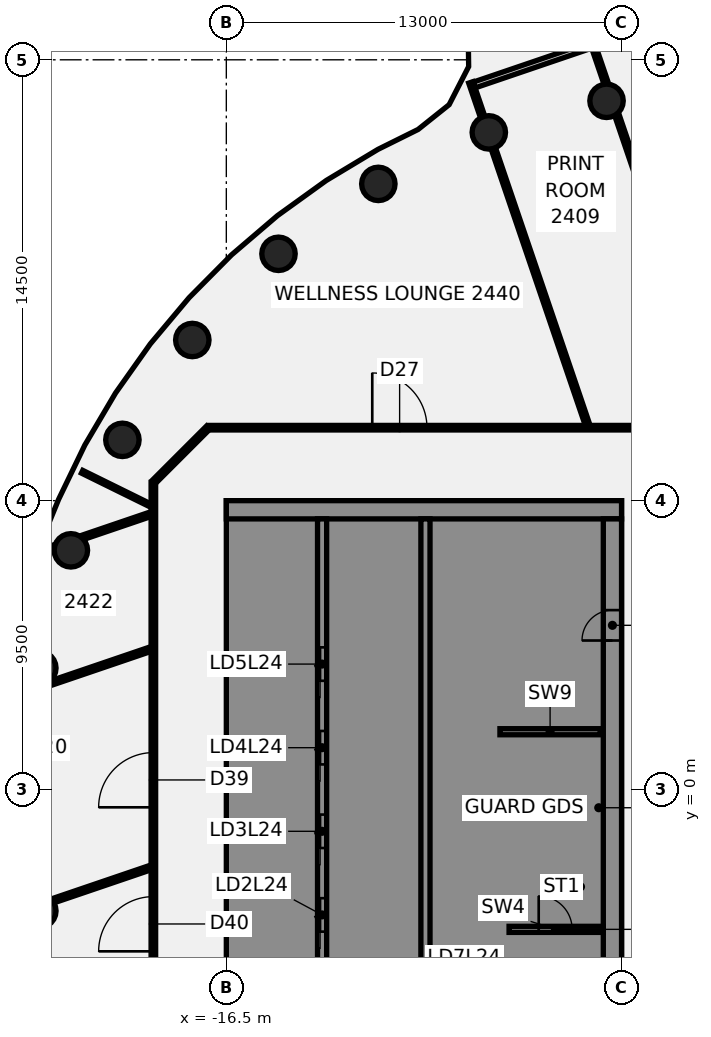
"""IFC4 building model, lengths in metres.
Left out: names, types, materials, properties, quantities, classifications, styles, units other than length and angle.
Written with IfcOpenShell. Run it as: python <this file> out.ifc"""

import sys

from ifc_helpers import new_model, si_unit, direction, frame, frame_2d, origin, origin_2d, place, context, subcontext, project, spatial, polyline, rectangle, circle, outline, extrude, element, fill, save


model = new_model("IFC4")
c1 = context("Model", 3, precision=1e-05, world=origin(), true_north=direction((0.0, 1.0)))
c2 = subcontext(c1, "Body", "Model", "MODEL_VIEW")
j1 = project(units=[si_unit("LENGTHUNIT", "METRE"), si_unit("PLANEANGLEUNIT", "RADIAN")], contexts=[c1])
p1 = place(None, origin())
s1 = spatial("IfcSite", under=j1, at=p1, CompositionType="ELEMENT")
p2 = place(p1, origin())
s2 = spatial("IfcBuilding", under=s1, at=p2, CompositionType="ELEMENT")
p3 = place(p2, frame((0.0, 0.0, 102.25)))
s3 = spatial("IfcBuildingStorey", under=s2, at=p3, CompositionType="ELEMENT", Elevation=102.25)
for number, where, z_axis, x_axis in (
    (1, (-3.994, 22.651, -0.14), (0.0, 0.0, 1.0), (1.0, 0.0, 0.0)),
    (2, (-7.866, 21.613, -0.14), (0.0, 0.0, 1.0), (1.0, 0.0, 0.0)),
    (3, (-11.5, 19.919, -0.14), (0.0, 0.0, 1.0), (1.0, 0.0, 0.0)),
    (4, (-14.784, 17.619, -0.14), (0.0, 0.0, 1.0), (1.0, 0.0, 0.0)),
    (5, (-17.619, 14.784, -0.14), (0.0, 0.0, 1.0), (1.0, 0.0, 0.0)),
    (6, (-19.919, 11.5, -0.14), (0.0, 0.0, 1.0), (1.0, 0.0, 0.0)),
    (7, (-21.613, 7.866, -0.14), (0.0, 0.0, 1.0), (1.0, 0.0, 0.0)),
    (8, (-22.651, 3.994, -0.14), (0.0, 0.0, 1.0), (1.0, 0.0, 0.0)),
    (9, (-22.651, -3.994, -0.14), (0.0, 0.0, 1.0), (1.0, 0.0, 0.0)),
):
    element("IfcColumn", number, at=place(p3, frame(where, z_axis=z_axis, x_axis=x_axis)), inside=s3, PredefinedType="COLUMN", context=c2, shape_type="SweptSolid", body=[
        extrude(circle(Radius=0.55, at=origin_2d()), origin(), (0.0, 0.0, 1.0), 3.75),
    ])
p4 = place(p3, frame((-8.457, 23.257, 0.0), z_axis=(0.0, 0.0, 1.0), x_axis=(0.322310236729, -0.946634095783, 0.0)))
e10 = element("IfcWall", 10, at=p4, inside=s3, PredefinedType="PARTITIONING", context=c2, shape_type="SweptSolid", body=[
    extrude(rectangle(XDim=1.203, YDim=0.15, at=frame_2d((0.602, 0.0))), origin(), (0.0, 0.0, 1.0), 3.01),
])
p5 = place(p3, frame((-7.719, 21.092, 0.0), z_axis=(0.0, 0.0, 1.0), x_axis=(0.322369221252, -0.946614010666, 0.0)))
e11 = element("IfcWall", 11, at=p5, inside=s3, PredefinedType="PARTITIONING", context=c2, shape_type="SweptSolid", body=[
    extrude(rectangle(XDim=9.626, YDim=0.15, at=frame_2d((4.813, 0.0))), origin(), (0.0, 0.0, 1.0), 3.01),
])
p6 = place(p3, frame((-4.411, 24.406, 0.0), z_axis=(0.0, 0.0, 1.0), x_axis=(0.322528601909, -0.94655971864, 0.0)))
e12 = element("IfcWall", 12, at=p6, inside=s3, PredefinedType="PARTITIONING", context=c2, shape_type="SweptSolid", body=[
    extrude(rectangle(XDim=1.266, YDim=0.15, at=frame_2d((0.633, 0.0))), origin(), (0.0, 0.0, 1.0), 3.01),
])
p7 = place(p3, frame((-3.665, 22.215, 0.0), z_axis=(0.0, 0.0, 1.0), x_axis=(0.322345171012, -0.94662220063, 0.0)))
e13 = element("IfcWall", 13, at=p7, inside=s3, PredefinedType="PARTITIONING", context=c2, shape_type="SweptSolid", body=[
    extrude(rectangle(XDim=10.812, YDim=0.15, at=frame_2d((5.406, 0.0))), origin(), (0.0, 0.0, 1.0), 3.01),
])
p8 = place(p7, frame((6.45, 0.0, 0.0)))
e14 = element("IfcOpeningElement", 14, at=p8, cuts=e13, PredefinedType="OPENING", context=c2, shape_type="SweptSolid", body=[
    extrude(rectangle(XDim=0.9, YDim=2.1, at=frame_2d((0.45, 1.05))), frame((0.0, 0.085, 0.0), z_axis=(0.0, -1.0, 0.0), x_axis=(1.0, 0.0, 0.0)), (0.0, 0.0, 1.0), 0.17),
])
p9 = place(p3, frame((-21.244, 10.45, 0.0), z_axis=(0.0, 0.0, 1.0), x_axis=(0.897216700268, -0.441590526122, 0.0)))
e15 = element("IfcWall", 15, at=p9, inside=s3, PredefinedType="PARTITIONING", context=c2, shape_type="SweptSolid", body=[
    extrude(rectangle(XDim=2.522, YDim=0.1, at=frame_2d((1.261, 0.0))), origin(), (0.0, 0.0, 1.0), 3.01),
])
p10 = place(p3, frame((-17.065, 11.9, 0.0), z_axis=(0.0, 0.0, 1.0), x_axis=(1.0, 0.0, 0.0)))
e16 = element("IfcWall", 16, at=p10, inside=s3, PredefinedType="PARTITIONING", context=c2, shape_type="SweptSolid", body=[
    extrude(rectangle(XDim=34.165, YDim=0.15, at=frame_2d((17.083, 0.0))), origin(), (0.0, 0.0, 1.0), 3.01),
])
p11 = place(p10, frame((19.613, 0.0, 0.0)))
e17 = element("IfcOpeningElement", 17, at=p11, cuts=e16, PredefinedType="OPENING", context=c2, shape_type="SweptSolid", body=[
    extrude(rectangle(XDim=1.8, YDim=2.1, at=frame_2d((0.9, 1.05))), frame((0.0, 0.085, 0.0), z_axis=(0.0, -1.0, 0.0), x_axis=(1.0, 0.0, 0.0)), (0.0, 0.0, 1.0), 0.17),
])
p12 = place(p10, frame((30.933, 0.0, 0.0)))
e18 = element("IfcOpeningElement", 18, at=p12, cuts=e16, PredefinedType="OPENING", context=c2, shape_type="SweptSolid", body=[
    extrude(rectangle(XDim=1.8, YDim=2.1, at=frame_2d((0.9, 1.05))), frame((0.0, 0.085, 0.0), z_axis=(0.0, -1.0, 0.0), x_axis=(1.0, 0.0, 0.0)), (0.0, 0.0, 1.0), 0.17),
])
p13 = place(p10, frame((5.365, 0.0, 0.0)))
e19 = element("IfcOpeningElement", 19, at=p13, cuts=e16, PredefinedType="OPENING", context=c2, shape_type="SweptSolid", body=[
    extrude(rectangle(XDim=1.8, YDim=2.1, at=frame_2d((0.9, 1.05))), frame((0.0, 0.085, 0.0), z_axis=(0.0, -1.0, 0.0), x_axis=(1.0, 0.0, 0.0)), (0.0, 0.0, 1.0), 0.17),
])
p14 = place(p3, frame((-26.598, 2.025, 0.0), z_axis=(0.0, 0.0, 1.0), x_axis=(0.946606379471, 0.322391628838, 0.0)))
e20 = element("IfcWall", 20, at=p14, inside=s3, PredefinedType="PARTITIONING", context=c2, shape_type="SweptSolid", body=[
    extrude(rectangle(XDim=8.048, YDim=0.15, at=frame_2d((4.024, 0.0))), origin(), (0.0, 0.0, 1.0), 3.01),
])
p15 = place(p14, frame((2.45, 0.0, 0.0)))
e21 = element("IfcOpeningElement", 21, at=p15, cuts=e20, PredefinedType="OPENING", context=c2, shape_type="SweptSolid", body=[
    extrude(rectangle(XDim=0.9, YDim=2.1, at=frame_2d((0.45, 1.05))), frame((0.0, 0.085, 0.0), z_axis=(0.0, -1.0, 0.0), x_axis=(1.0, 0.0, 0.0)), (0.0, 0.0, 1.0), 0.17),
])
p16 = place(p3, frame((-22.215, -3.665, 0.0), z_axis=(0.0, 0.0, 1.0), x_axis=(0.946648978423, 0.322266522697, 0.0)))
e22 = element("IfcWall", 22, at=p16, inside=s3, PredefinedType="PARTITIONING", context=c2, shape_type="SweptSolid", body=[
    extrude(rectangle(XDim=3.417, YDim=0.15, at=frame_2d((1.708, 0.0))), origin(), (0.0, 0.0, 1.0), 3.01),
])
p17 = place(p3, frame((-22.467, 7.869, 0.0), z_axis=(0.0, 0.0, 1.0), x_axis=(0.946742345381, 0.321992129505, 0.0)))
e23 = element("IfcWall", 23, at=p17, inside=s3, PredefinedType="PARTITIONING", context=c2, shape_type="SweptSolid", body=[
    extrude(rectangle(XDim=0.343, YDim=0.15, at=frame_2d((0.171, 0.0))), origin(), (0.0, 0.0, 1.0), 3.01),
])
p18 = place(p3, frame((-21.261, 8.28, 0.0), z_axis=(0.0, 0.0, 1.0), x_axis=(0.946606493427, 0.32239129424, 0.0)))
e24 = element("IfcWall", 24, at=p18, inside=s3, PredefinedType="PARTITIONING", context=c2, shape_type="SweptSolid", body=[
    extrude(rectangle(XDim=2.41, YDim=0.15, at=frame_2d((1.205, 0.0))), origin(), (0.0, 0.0, 1.0), 3.01),
])
p19 = place(p3, frame((-8.348, 23.171, 0.0), z_axis=(0.0, 0.0, 1.0), x_axis=(0.946615697292, 0.322364268555, 0.0)))
e25 = element("IfcWall", 25, at=p19, inside=s3, PredefinedType="PARTITIONING", context=c2, shape_type="SweptSolid", body=[
    extrude(rectangle(XDim=14.224, YDim=0.2, at=frame_2d((7.112, 0.0))), origin(), (0.0, 0.0, 1.0), 3.01),
])
p20 = place(p19, frame((6.925, 0.0, 0.0)))
e26 = element("IfcOpeningElement", 26, at=p20, cuts=e25, PredefinedType="OPENING", context=c2, shape_type="SweptSolid", body=[
    extrude(rectangle(XDim=1.4, YDim=2.1, at=frame_2d((0.7, 1.05))), frame((0.0, 0.11, 0.0), z_axis=(0.0, -1.0, 0.0), x_axis=(1.0, 0.0, 0.0)), (0.0, 0.0, 1.0), 0.22),
])
p21 = place(p19, frame((9.175, 0.0, 0.0)))
e27 = element("IfcOpeningElement", 27, at=p21, cuts=e25, PredefinedType="OPENING", context=c2, shape_type="SweptSolid", body=[
    extrude(rectangle(XDim=0.9, YDim=2.1, at=frame_2d((0.45, 1.05))), frame((0.0, 0.11, 0.0), z_axis=(0.0, -1.0, 0.0), x_axis=(1.0, 0.0, 0.0)), (0.0, 0.0, 1.0), 0.22),
])
p22 = place(p3, frame((-18.872, 10.128, 0.0), z_axis=(0.0, 0.0, 1.0), x_axis=(0.707106781187, 0.707106781187, 0.0)))
e28 = element("IfcWall", 28, at=p22, inside=s3, PredefinedType="PARTITIONING", context=c2, shape_type="SweptSolid", body=[
    extrude(rectangle(XDim=2.505, YDim=0.15, at=frame_2d((1.253, 0.0))), origin(), (0.0, 0.0, 1.0), 3.01),
])
p23 = place(p3, frame((-18.9, -10.1, 0.0), z_axis=(0.0, 0.0, 1.0), x_axis=(0.0, 1.0, 0.0)))
e29 = element("IfcWall", 29, at=p23, inside=s3, PredefinedType="PARTITIONING", context=c2, shape_type="SweptSolid", body=[
    extrude(rectangle(XDim=20.2, YDim=0.15, at=frame_2d((10.1, 0.0))), origin(), (0.0, 0.0, 1.0), 3.01),
])
p24 = place(p23, frame((9.514, 0.0, 0.0)))
e30 = element("IfcOpeningElement", 30, at=p24, cuts=e29, PredefinedType="OPENING", context=c2, shape_type="SweptSolid", body=[
    extrude(rectangle(XDim=1.8, YDim=2.1, at=frame_2d((0.9, 1.05))), frame((0.0, 0.085, 0.0), z_axis=(0.0, -1.0, 0.0), x_axis=(1.0, 0.0, 0.0)), (0.0, 0.0, 1.0), 0.17),
])
p25 = place(p23, frame((4.777, 0.0, 0.0)))
e31 = element("IfcOpeningElement", 31, at=p25, cuts=e29, PredefinedType="OPENING", context=c2, shape_type="SweptSolid", body=[
    extrude(rectangle(XDim=1.8, YDim=2.1, at=frame_2d((0.9, 1.05))), frame((0.0, 0.085, 0.0), z_axis=(0.0, -1.0, 0.0), x_axis=(1.0, 0.0, 0.0)), (0.0, 0.0, 1.0), 0.17),
])
p26 = place(p3, origin())
e32 = element("IfcWall", 32, at=p26, inside=s3, PredefinedType="SHEAR", context=c2, shape_type="SweptSolid", body=[
    extrude(outline(polyline([(-13.5, -8.9), (-13.5, -8.125), (-15.9, -8.125), (-15.9, -5.625), (-13.5, -5.625), (-13.5, -5.375), (-15.9, -5.375), (-15.9, -2.875), (-13.5, -2.875), (-13.5, -2.625), (-15.9, -2.625), (-15.9, -0.125), (-13.5, -0.125), (-13.5, 0.125), (-15.9, 0.125), (-15.9, 2.625), (-13.5, 2.625), (-13.5, 2.875), (-15.9, 2.875), (-15.9, 5.375), (-13.5, 5.375), (-13.5, 5.625), (-15.9, 5.625), (-15.9, 8.125), (-13.5, 8.125), (-13.5, 8.9), (-15.9, 8.9), (-16.5, 8.9), (-16.5, -8.9), (-15.9, -8.9), (-13.5, -8.9)])), origin(), (0.0, 0.0, 1.0), 3.61),
])
p27 = place(p3, frame((-16.5, 9.2, 0.0), z_axis=(0.0, 0.0, 1.0), x_axis=(1.0, 0.0, 0.0)))
e33 = element("IfcWall", 33, at=p27, inside=s3, PredefinedType="SHEAR", context=c2, shape_type="SweptSolid", body=[
    extrude(rectangle(XDim=13.0, YDim=0.6, at=frame_2d((6.5, 0.0))), origin(), (0.0, 0.0, 1.0), 3.61),
])
p28 = place(p3, origin())
e34 = element("IfcWall", 34, at=p28, inside=s3, PredefinedType="SHEAR", context=c2, shape_type="SweptSolid", body=[
    extrude(outline(polyline([(-9.8, -5.375), (-9.8, -5.625), (-7.5, -5.625), (-7.2, -5.625), (-7.2, 8.9), (-7.5, 8.9), (-9.8, 8.9), (-9.8, 8.125), (-7.5, 8.125), (-7.5, 5.625), (-9.8, 5.625), (-9.8, 5.375), (-7.5, 5.375), (-7.5, 2.875), (-9.8, 2.875), (-9.8, 2.625), (-7.5, 2.625), (-7.5, 0.125), (-9.8, 0.125), (-9.8, -0.125), (-7.5, -0.125), (-7.5, -2.625), (-9.8, -2.625), (-9.8, -2.875), (-7.5, -2.875), (-7.5, -5.375), (-9.8, -5.375)])), origin(), (0.0, 0.0, 1.0), 3.61),
])
p29 = place(p3, frame((-7.5, 1.9, 0.0), z_axis=(0.0, 0.0, 1.0), x_axis=(1.0, 0.0, 0.0)))
e35 = element("IfcWall", 35, at=p29, inside=s3, PredefinedType="SHEAR", context=c2, shape_type="SweptSolid", body=[
    extrude(rectangle(XDim=3.3, YDim=0.2, at=frame_2d((1.65, 0.0))), origin(), (0.0, 0.0, 1.0), 3.61),
])
p30 = place(p3, frame((-13.35, -8.9, 0.0), z_axis=(0.0, 0.0, 1.0), x_axis=(0.0, 1.0, 0.0)))
e36 = element("IfcWall", 36, at=p30, inside=s3, PredefinedType="SHEAR", context=c2, shape_type="SweptSolid", body=[
    extrude(rectangle(XDim=17.8, YDim=0.3, at=frame_2d((8.9, 0.0))), origin(), (0.0, 0.0, 1.0), 3.61),
])
p31 = place(p30, frame((1.325, 0.0, 0.0)))
e37 = element("IfcOpeningElement", 37, at=p31, cuts=e36, PredefinedType="OPENING", context=c2, shape_type="SweptSolid", body=[
    extrude(rectangle(XDim=1.4, YDim=2.1, at=frame_2d((0.7, 1.05))), frame((0.0, 0.16, 0.0), z_axis=(0.0, -1.0, 0.0), x_axis=(1.0, 0.0, 0.0)), (0.0, 0.0, 1.0), 0.32),
])
p32 = place(p30, frame((4.225, 0.0, 0.0)))
e38 = element("IfcOpeningElement", 38, at=p32, cuts=e36, PredefinedType="OPENING", context=c2, shape_type="SweptSolid", body=[
    extrude(rectangle(XDim=1.1, YDim=2.1, at=frame_2d((0.55, 1.05))), frame((0.0, 0.16, 0.0), z_axis=(0.0, -1.0, 0.0), x_axis=(1.0, 0.0, 0.0)), (0.0, 0.0, 1.0), 0.32),
])
p33 = place(p30, frame((6.975, 0.0, 0.0)))
e39 = element("IfcOpeningElement", 39, at=p33, cuts=e36, PredefinedType="OPENING", context=c2, shape_type="SweptSolid", body=[
    extrude(rectangle(XDim=1.1, YDim=2.1, at=frame_2d((0.55, 1.05))), frame((0.0, 0.16, 0.0), z_axis=(0.0, -1.0, 0.0), x_axis=(1.0, 0.0, 0.0)), (0.0, 0.0, 1.0), 0.32),
])
p34 = place(p30, frame((9.725, 0.0, 0.0)))
e40 = element("IfcOpeningElement", 40, at=p34, cuts=e36, PredefinedType="OPENING", context=c2, shape_type="SweptSolid", body=[
    extrude(rectangle(XDim=1.1, YDim=2.1, at=frame_2d((0.55, 1.05))), frame((0.0, 0.16, 0.0), z_axis=(0.0, -1.0, 0.0), x_axis=(1.0, 0.0, 0.0)), (0.0, 0.0, 1.0), 0.32),
])
p35 = place(p30, frame((12.475, 0.0, 0.0)))
e41 = element("IfcOpeningElement", 41, at=p35, cuts=e36, PredefinedType="OPENING", context=c2, shape_type="SweptSolid", body=[
    extrude(rectangle(XDim=1.1, YDim=2.1, at=frame_2d((0.55, 1.05))), frame((0.0, 0.16, 0.0), z_axis=(0.0, -1.0, 0.0), x_axis=(1.0, 0.0, 0.0)), (0.0, 0.0, 1.0), 0.32),
])
p36 = place(p3, frame((-9.95, -8.9, 0.0), z_axis=(0.0, 0.0, 1.0), x_axis=(0.0, 1.0, 0.0)))
e42 = element("IfcWall", 42, at=p36, inside=s3, PredefinedType="SHEAR", context=c2, shape_type="SweptSolid", body=[
    extrude(rectangle(XDim=17.8, YDim=0.3, at=frame_2d((8.9, 0.0))), origin(), (0.0, 0.0, 1.0), 3.61),
])
p37 = place(p3, frame((-3.8, -8.9, 0.0), z_axis=(0.0, 0.0, 1.0), x_axis=(0.0, 1.0, 0.0)))
e43 = element("IfcWall", 43, at=p37, inside=s3, PredefinedType="SHEAR", context=c2, shape_type="SweptSolid", body=[
    extrude(rectangle(XDim=17.8, YDim=0.6, at=frame_2d((8.9, 0.0))), origin(), (0.0, 0.0, 1.0), 3.61),
])
p38 = place(p37, frame((1.25, 0.0, 0.0)))
e44 = element("IfcOpeningElement", 44, at=p38, cuts=e43, PredefinedType="OPENING", context=c2, shape_type="SweptSolid", body=[
    extrude(rectangle(XDim=1.8, YDim=2.1, at=frame_2d((0.9, 1.05))), frame((0.0, 0.31, 0.0), z_axis=(0.0, -1.0, 0.0), x_axis=(1.0, 0.0, 0.0)), (0.0, 0.0, 1.0), 0.62),
])
p39 = place(p37, frame((13.8, 0.0, 0.0)))
e45 = element("IfcOpeningElement", 45, at=p39, cuts=e43, PredefinedType="OPENING", context=c2, shape_type="SweptSolid", body=[
    extrude(rectangle(XDim=1.0, YDim=2.1, at=frame_2d((0.5, 1.05))), frame((0.0, 0.31, 0.0), z_axis=(0.0, -1.0, 0.0), x_axis=(1.0, 0.0, 0.0)), (0.0, 0.0, 1.0), 0.62),
])
p40 = place(p3, frame((-7.2, -4.6, 0.0), z_axis=(0.0, 0.0, 1.0), x_axis=(1.0, 0.0, 0.0)))
e46 = element("IfcWall", 46, at=p40, inside=s3, PredefinedType="SHEAR", context=c2, shape_type="SweptSolid", body=[
    extrude(rectangle(XDim=3.1, YDim=0.2, at=frame_2d((1.55, 0.0))), origin(), (0.0, 0.0, 1.0), 3.61),
])
p41 = place(p40, frame((0.975, 0.0, 0.0)))
e47 = element("IfcOpeningElement", 47, at=p41, cuts=e46, PredefinedType="OPENING", context=c2, shape_type="SweptSolid", body=[
    extrude(rectangle(XDim=1.1, YDim=2.1, at=frame_2d((0.55, 1.05))), frame((0.0, 0.11, 0.0), z_axis=(0.0, -1.0, 0.0), x_axis=(1.0, 0.0, 0.0)), (0.0, 0.0, 1.0), 0.22),
])
p42 = place(p13, origin())
e48 = element("IfcDoor", 48, at=p42, inside=s3, OperationType="DOUBLE_DOOR_SINGLE_SWING", PredefinedType="DOOR", context=c2, shape_type="SweptSolid", body=[
    extrude(rectangle(XDim=1.8, YDim=2.1, at=frame_2d((0.9, 1.05))), frame((0.0, 0.025, 0.0), z_axis=(0.0, -1.0, 0.0), x_axis=(1.0, 0.0, 0.0)), (0.0, 0.0, 1.0), 0.05),
])
fill(e19, e48)
p43 = place(p24, frame((1.8, 0.0, 0.0), z_axis=(0.0, 0.0, 1.0), x_axis=(-1.0, 0.0, 0.0)))
e49 = element("IfcDoor", 49, at=p43, inside=s3, OperationType="DOUBLE_DOOR_SINGLE_SWING", PredefinedType="DOOR", context=c2, shape_type="SweptSolid", body=[
    extrude(rectangle(XDim=1.8, YDim=2.1, at=frame_2d((0.9, 1.05))), frame((0.0, 0.025, 0.0), z_axis=(0.0, -1.0, 0.0), x_axis=(1.0, 0.0, 0.0)), (0.0, 0.0, 1.0), 0.05),
])
fill(e30, e49)
p44 = place(p25, origin())
e50 = element("IfcDoor", 50, at=p44, inside=s3, OperationType="DOUBLE_DOOR_SINGLE_SWING", PredefinedType="DOOR", context=c2, shape_type="SweptSolid", body=[
    extrude(rectangle(XDim=1.8, YDim=2.1, at=frame_2d((0.9, 1.05))), frame((0.0, 0.025, 0.0), z_axis=(0.0, -1.0, 0.0), x_axis=(1.0, 0.0, 0.0)), (0.0, 0.0, 1.0), 0.05),
])
fill(e31, e50)
p45 = place(p39, origin())
e51 = element("IfcDoor", 51, at=p45, inside=s3, OperationType="SINGLE_SWING_LEFT", PredefinedType="DOOR", context=c2, shape_type="SweptSolid", body=[
    extrude(rectangle(XDim=1.0, YDim=2.1, at=frame_2d((0.5, 1.05))), frame((0.0, 0.025, 0.0), z_axis=(0.0, -1.0, 0.0), x_axis=(1.0, 0.0, 0.0)), (0.0, 0.0, 1.0), 0.05),
])
fill(e45, e51)
p46 = place(p41, origin())
e52 = element("IfcDoor", 52, at=p46, inside=s3, OperationType="SINGLE_SWING_LEFT", PredefinedType="DOOR", context=c2, shape_type="SweptSolid", body=[
    extrude(rectangle(XDim=1.1, YDim=2.1, at=frame_2d((0.55, 1.05))), frame((0.0, 0.025, 0.0), z_axis=(0.0, -1.0, 0.0), x_axis=(1.0, 0.0, 0.0)), (0.0, 0.0, 1.0), 0.05),
])
fill(e47, e52)
p47 = place(p32, origin())
e53 = element("IfcDoor", 53, at=p47, inside=s3, OperationType="SLIDING_TO_LEFT", PredefinedType="DOOR", context=c2, shape_type="SweptSolid", body=[
    extrude(rectangle(XDim=1.1, YDim=2.1, at=frame_2d((0.55, 1.05))), frame((0.0, 0.025, 0.0), z_axis=(0.0, -1.0, 0.0), x_axis=(1.0, 0.0, 0.0)), (0.0, 0.0, 1.0), 0.05),
])
fill(e38, e53)
p48 = place(p33, origin())
e54 = element("IfcDoor", 54, at=p48, inside=s3, OperationType="SLIDING_TO_LEFT", PredefinedType="DOOR", context=c2, shape_type="SweptSolid", body=[
    extrude(rectangle(XDim=1.1, YDim=2.1, at=frame_2d((0.55, 1.05))), frame((0.0, 0.025, 0.0), z_axis=(0.0, -1.0, 0.0), x_axis=(1.0, 0.0, 0.0)), (0.0, 0.0, 1.0), 0.05),
])
fill(e39, e54)
p49 = place(p34, origin())
e55 = element("IfcDoor", 55, at=p49, inside=s3, OperationType="SLIDING_TO_LEFT", PredefinedType="DOOR", context=c2, shape_type="SweptSolid", body=[
    extrude(rectangle(XDim=1.1, YDim=2.1, at=frame_2d((0.55, 1.05))), frame((0.0, 0.025, 0.0), z_axis=(0.0, -1.0, 0.0), x_axis=(1.0, 0.0, 0.0)), (0.0, 0.0, 1.0), 0.05),
])
fill(e40, e55)
p50 = place(p35, origin())
e56 = element("IfcDoor", 56, at=p50, inside=s3, OperationType="SLIDING_TO_LEFT", PredefinedType="DOOR", context=c2, shape_type="SweptSolid", body=[
    extrude(rectangle(XDim=1.1, YDim=2.1, at=frame_2d((0.55, 1.05))), frame((0.0, 0.025, 0.0), z_axis=(0.0, -1.0, 0.0), x_axis=(1.0, 0.0, 0.0)), (0.0, 0.0, 1.0), 0.05),
])
fill(e41, e56)
save(model, sys.argv[1])
